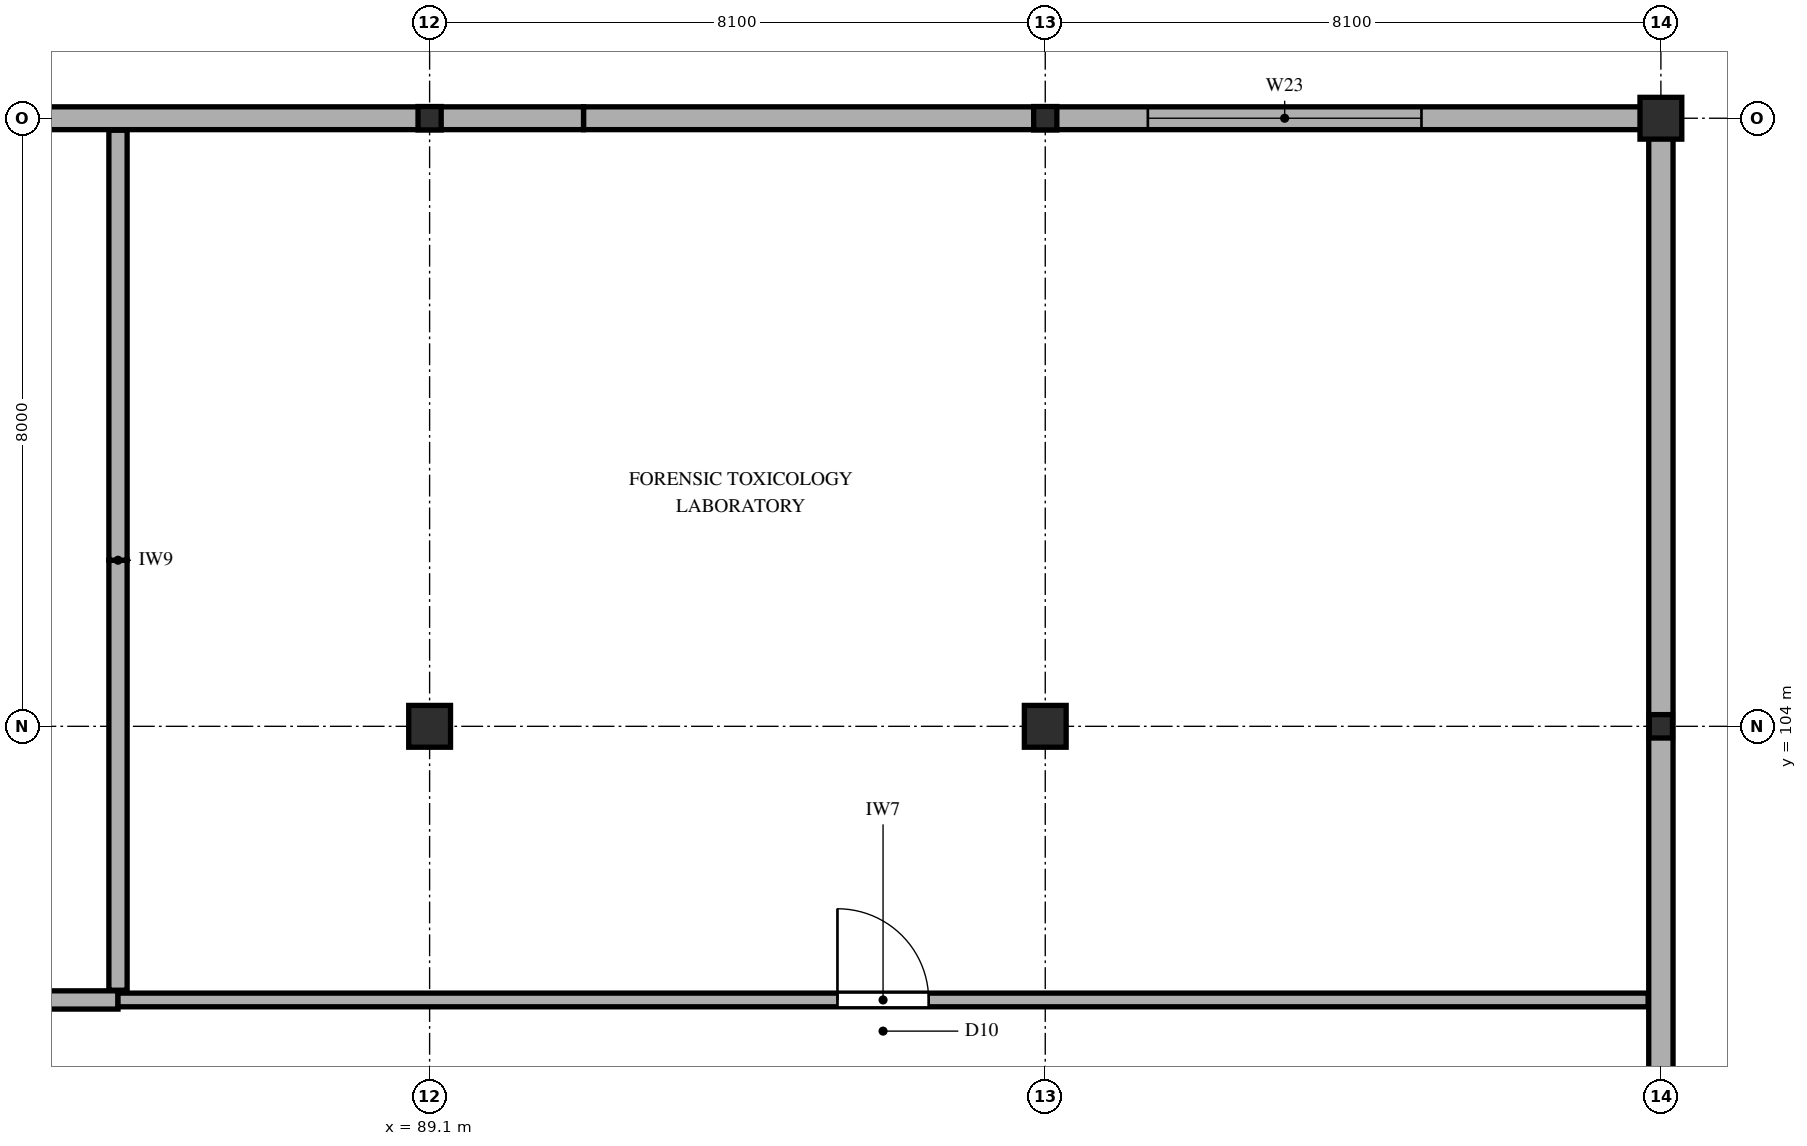
"""IFC4 building model, lengths in metres.
Left out: names, types, materials, properties, quantities, classifications, styles, units other than length and angle.
Written with IfcOpenShell. Run it as: python <this file> out.ifc"""

import sys

from ifc_helpers import new_model, si_unit, direction, frame, frame_2d, origin, origin_2d, place, context, subcontext, project, spatial, rectangle, i_section, extrude, element, fill, save


model = new_model("IFC4")
c1 = context("Model", 3, precision=1e-05, world=origin(), true_north=direction((0.0, 1.0)))
c2 = subcontext(c1, "Body", "Model", "MODEL_VIEW")
j1 = project(units=[si_unit("LENGTHUNIT", "METRE"), si_unit("PLANEANGLEUNIT", "RADIAN")], contexts=[c1])
p1 = place(None, origin())
s1 = spatial("IfcSite", under=j1, at=p1, CompositionType="ELEMENT")
p2 = place(p1, origin())
s2 = spatial("IfcBuilding", under=s1, at=p2, CompositionType="ELEMENT")
p3 = place(p2, frame((0.0, 0.0, 19.8)))
s3 = spatial("IfcBuildingStorey", under=s2, at=p3, CompositionType="ELEMENT", Elevation=19.8)
p4 = place(p3, frame((89.1, 104.0, 0.0), z_axis=(0.0, 0.0, 1.0), x_axis=(1.0, 0.0, 0.0)))
e1 = element("IfcColumn", 1, at=p4, inside=s3, PredefinedType="COLUMN", context=c2, shape_type="SweptSolid", body=[
    extrude(rectangle(XDim=0.55, YDim=0.55, at=origin_2d()), origin(), (0.0, 0.0, 1.0), 5.1),
])
p5 = place(p3, frame((89.1, 112.0, 0.0), z_axis=(0.0, 0.0, 1.0), x_axis=(1.0, 0.0, 0.0)))
e2 = element("IfcColumn", 2, at=p5, inside=s3, PredefinedType="COLUMN", context=c2, shape_type="SweptSolid", body=[
    extrude(i_section(OverallWidth=0.305, OverallDepth=0.308, WebThickness=0.01, FlangeThickness=0.015, FilletRadius=0.015, at=origin_2d()), origin(), (0.0, 0.0, 1.0), 5.1),
])
p6 = place(p3, frame((97.2, 104.0, 0.0), z_axis=(0.0, 0.0, 1.0), x_axis=(1.0, 0.0, 0.0)))
e3 = element("IfcColumn", 3, at=p6, inside=s3, PredefinedType="COLUMN", context=c2, shape_type="SweptSolid", body=[
    extrude(rectangle(XDim=0.55, YDim=0.55, at=origin_2d()), origin(), (0.0, 0.0, 1.0), 4.76),
])
for number, where, z_axis, x_axis in (
    (4, (97.2, 112.0, 0.0), (0.0, 0.0, 1.0), (1.0, 0.0, 0.0)),
    (5, (105.3, 104.0, 0.0), (0.0, 0.0, 1.0), (1.0, 0.0, 0.0)),
):
    element("IfcColumn", number, at=place(p3, frame(where, z_axis=z_axis, x_axis=x_axis)), inside=s3, PredefinedType="COLUMN", context=c2, shape_type="SweptSolid", body=[
        extrude(i_section(OverallWidth=0.305, OverallDepth=0.308, WebThickness=0.01, FlangeThickness=0.015, FilletRadius=0.015, at=origin_2d()), origin(), (0.0, 0.0, 1.0), 4.76),
    ])
p7 = place(p3, frame((105.3, 112.0, 0.0), z_axis=(0.0, 0.0, 1.0), x_axis=(1.0, 0.0, 0.0)))
e6 = element("IfcColumn", 6, at=p7, inside=s3, PredefinedType="COLUMN", context=c2, shape_type="SweptSolid", body=[
    extrude(rectangle(XDim=0.55, YDim=0.55, at=origin_2d()), origin(), (0.0, 0.0, 1.0), 4.76),
])
p8 = place(p3, frame((105.3, 96.18, 0.0), z_axis=(0.0, 0.0, 1.0), x_axis=(0.0, 1.0, 0.0)))
e7 = element("IfcWall", 7, at=p8, inside=s3, PredefinedType="SOLIDWALL", context=c2, shape_type="SweptSolid", body=[
    extrude(rectangle(XDim=15.82, YDim=0.32, at=frame_2d((7.91, 0.0))), origin(), (0.0, 0.0, 1.0), 4.289),
])
p9 = place(p3, frame((105.3, 112.0, 0.0), z_axis=(0.0, 0.0, 1.0), x_axis=(-1.0, 0.0, 0.0)))
e8 = element("IfcWall", 8, at=p9, inside=s3, PredefinedType="SOLIDWALL", context=c2, shape_type="SweptSolid", body=[
    extrude(rectangle(XDim=14.175, YDim=0.3, at=frame_2d((7.087, 0.0))), origin(), (0.0, 0.0, 1.0), 4.202),
])
p10 = place(p9, frame((3.15, 0.0, 0.95)))
e9 = element("IfcOpeningElement", 9, at=p10, cuts=e8, PredefinedType="OPENING", context=c2, shape_type="SweptSolid", body=[
    extrude(rectangle(XDim=3.6, YDim=0.9, at=frame_2d((1.8, 0.45))), frame((0.0, 0.16, 0.0), z_axis=(0.0, -1.0, 0.0), x_axis=(1.0, 0.0, 0.0)), (0.0, 0.0, 1.0), 0.32),
])
p11 = place(p3, frame((91.125, 112.0, 0.0), z_axis=(0.0, 0.0, 1.0), x_axis=(-1.0, 0.0, 0.0)))
e10 = element("IfcWall", 10, at=p11, inside=s3, PredefinedType="SOLIDWALL", context=c2, shape_type="SweptSolid", body=[
    extrude(rectangle(XDim=14.175, YDim=0.3, at=frame_2d((7.087, 0.0))), origin(), (0.0, 0.0, 1.0), 4.202),
])
p12 = place(p3, frame((65.4, 100.4, 0.0), z_axis=(0.0, 0.0, 1.0), x_axis=(1.0, 0.0, 0.0)))
e11 = element("IfcWall", 11, at=p12, inside=s3, PredefinedType="PARTITIONING", context=c2, shape_type="SweptSolid", body=[
    extrude(rectangle(XDim=19.6, YDim=0.24, at=frame_2d((9.8, 0.0))), origin(), (0.0, 0.0, 1.0), 4.86),
])
p13 = place(p12, frame((9.2, 0.0, 0.0)))
e12 = element("IfcOpeningElement", 12, at=p13, cuts=e11, PredefinedType="OPENING", context=c2, shape_type="SweptSolid", body=[
    extrude(rectangle(XDim=1.2, YDim=2.3, at=frame_2d((0.6, 1.15))), frame((0.0, 0.13, 0.0), z_axis=(0.0, -1.0, 0.0), x_axis=(1.0, 0.0, 0.0)), (0.0, 0.0, 1.0), 0.26),
])
p14 = place(p3, frame((85.0, 100.4, 0.0), z_axis=(0.0, 0.0, 1.0), x_axis=(1.0, 0.0, 0.0)))
e13 = element("IfcWall", 13, at=p14, inside=s3, PredefinedType="PARTITIONING", context=c2, shape_type="SweptSolid", body=[
    extrude(rectangle(XDim=20.132, YDim=0.18, at=frame_2d((10.066, 0.0))), origin(), (0.0, 0.0, 1.0), 4.86),
])
p15 = place(p14, frame((9.466, 0.0, 0.0)))
e14 = element("IfcOpeningElement", 14, at=p15, cuts=e13, PredefinedType="OPENING", context=c2, shape_type="SweptSolid", body=[
    extrude(rectangle(XDim=1.2, YDim=2.3, at=frame_2d((0.6, 1.15))), frame((0.0, 0.1, 0.0), z_axis=(0.0, -1.0, 0.0), x_axis=(1.0, 0.0, 0.0)), (0.0, 0.0, 1.0), 0.2),
])
for number, where, z_axis, x_axis in (
    (15, (85.0, 100.528, 0.0), (0.0, 0.0, 1.0), (0.0, 1.0, 0.0)),
    (16, (85.0, 106.185, 0.0), (0.0, 0.0, 1.0), (0.0, 1.0, 0.0)),
):
    element("IfcWall", number, at=place(p3, frame(where, z_axis=z_axis, x_axis=x_axis)), inside=s3, PredefinedType="PARTITIONING", context=c2, shape_type="SweptSolid", body=[
        extrude(rectangle(XDim=5.657, YDim=0.24, at=frame_2d((2.829, 0.0))), origin(), (0.0, 0.0, 1.0), 4.498),
    ])
p16 = place(p10, origin())
e17 = element("IfcWindow", 17, at=p16, inside=s3, PartitioningType="TRIPLE_PANEL_VERTICAL", PredefinedType="WINDOW", context=c2, shape_type="SweptSolid", body=[
    extrude(rectangle(XDim=3.6, YDim=0.9, at=frame_2d((1.8, 0.45))), frame((0.0, 0.03, 0.0), z_axis=(0.0, -1.0, 0.0), x_axis=(1.0, 0.0, 0.0)), (0.0, 0.0, 1.0), 0.06),
])
fill(e9, e17)
p17 = place(p15, origin())
e18 = element("IfcDoor", 18, at=p17, inside=s3, OperationType="SINGLE_SWING_LEFT", PredefinedType="DOOR", context=c2, shape_type="SweptSolid", body=[
    extrude(rectangle(XDim=1.2, YDim=2.3, at=frame_2d((0.6, 1.15))), frame((0.0, 0.025, 0.0), z_axis=(0.0, -1.0, 0.0), x_axis=(1.0, 0.0, 0.0)), (0.0, 0.0, 1.0), 0.05),
])
fill(e14, e18)
save(model, sys.argv[1])
